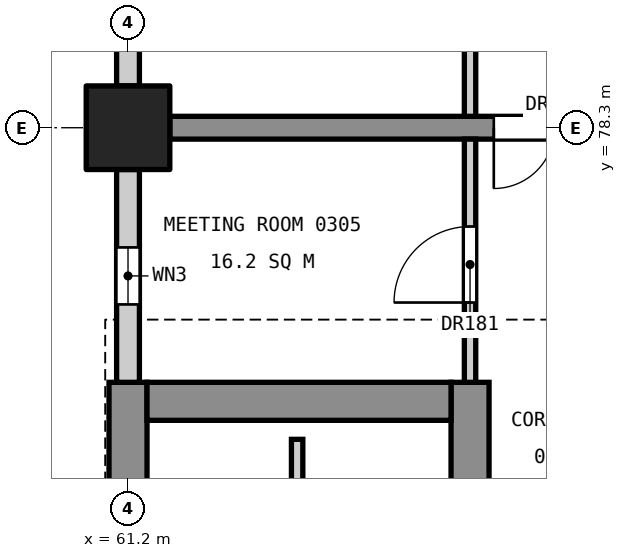
"""IFC4 building model, lengths in metres.
Left out: names, types, materials, properties, quantities, classifications, styles, units other than length and angle.
Written with IfcOpenShell. Run it as: python <this file> out.ifc"""

import sys

from ifc_helpers import new_model, si_unit, direction, frame, frame_2d, origin, origin_2d, place, context, subcontext, project, spatial, rectangle, extrude, element, fill, save


model = new_model("IFC4")
c1 = context("Model", 3, precision=1e-05, world=origin(), true_north=direction((0.0, 1.0)))
c2 = subcontext(c1, "Body", "Model", "MODEL_VIEW")
j1 = project(units=[si_unit("LENGTHUNIT", "METRE"), si_unit("PLANEANGLEUNIT", "RADIAN")], contexts=[c1])
p1 = place(None, origin())
s1 = spatial("IfcSite", under=j1, at=p1, CompositionType="ELEMENT")
p2 = place(p1, origin())
s2 = spatial("IfcBuilding", under=s1, at=p2, CompositionType="ELEMENT")
p3 = place(p2, frame((0.0, 0.0, 16.8)))
s3 = spatial("IfcBuildingStorey", under=s2, at=p3, CompositionType="ELEMENT", Elevation=16.8)
p4 = place(p3, frame((61.2, 78.3, 0.0), z_axis=(0.0, 0.0, 1.0), x_axis=(1.0, 0.0, 0.0)))
e1 = element("IfcColumn", 1, at=p4, inside=s3, PredefinedType="COLUMN", context=c2, shape_type="SweptSolid", body=[
    extrude(rectangle(XDim=1.1, YDim=1.1, at=origin_2d()), origin(), (0.0, 0.0, 1.0), 5.4),
])
p5 = place(p3, frame((61.2, 60.05, 0.0), z_axis=(0.0, 0.0, 1.0), x_axis=(0.0, 1.0, 0.0)))
e2 = element("IfcWall", 2, at=p5, inside=s3, PredefinedType="SHEAR", context=c2, shape_type="SweptSolid", body=[
    extrude(rectangle(XDim=14.9, YDim=0.5, at=frame_2d((7.45, 0.0))), origin(), (0.0, 0.0, 1.0), 5.15),
])
p6 = place(p5, frame((6.3, 0.0, 3.4)))
e3 = element("IfcOpeningElement", 3, at=p6, cuts=e2, PredefinedType="OPENING", context=c2, shape_type="SweptSolid", body=[
    extrude(rectangle(XDim=1.2, YDim=0.9, at=frame_2d((0.6, 0.45))), frame((0.0, 0.26, 0.0), z_axis=(0.0, -1.0, 0.0), x_axis=(1.0, 0.0, 0.0)), (0.0, 0.0, 1.0), 0.52),
])
p7 = place(p3, frame((65.7, 60.05, 0.0), z_axis=(0.0, 0.0, 1.0), x_axis=(0.0, 1.0, 0.0)))
e4 = element("IfcWall", 4, at=p7, inside=s3, PredefinedType="SHEAR", context=c2, shape_type="SweptSolid", body=[
    extrude(rectangle(XDim=14.9, YDim=0.5, at=frame_2d((7.45, 0.0))), origin(), (0.0, 0.0, 1.0), 5.15),
])
p8 = place(p7, frame((0.55, 0.0, 0.0)))
e5 = element("IfcOpeningElement", 5, at=p8, cuts=e4, PredefinedType="OPENING", context=c2, shape_type="SweptSolid", body=[
    extrude(rectangle(XDim=1.4, YDim=2.1, at=frame_2d((0.7, 1.05))), frame((0.0, 0.26, 0.0), z_axis=(0.0, -1.0, 0.0), x_axis=(1.0, 0.0, 0.0)), (0.0, 0.0, 1.0), 0.52),
])
p9 = place(p7, frame((8.85, 0.0, 0.0)))
e6 = element("IfcOpeningElement", 6, at=p9, cuts=e4, PredefinedType="OPENING", context=c2, shape_type="SweptSolid", body=[
    extrude(rectangle(XDim=1.1, YDim=2.1, at=frame_2d((0.55, 1.05))), frame((0.0, 0.26, 0.0), z_axis=(0.0, -1.0, 0.0), x_axis=(1.0, 0.0, 0.0)), (0.0, 0.0, 1.0), 0.52),
])
p10 = place(p7, frame((11.4, 0.0, 0.0)))
e7 = element("IfcOpeningElement", 7, at=p10, cuts=e4, PredefinedType="OPENING", context=c2, shape_type="SweptSolid", body=[
    extrude(rectangle(XDim=1.1, YDim=2.1, at=frame_2d((0.55, 1.05))), frame((0.0, 0.26, 0.0), z_axis=(0.0, -1.0, 0.0), x_axis=(1.0, 0.0, 0.0)), (0.0, 0.0, 1.0), 0.52),
])
p11 = place(p3, frame((61.45, 74.7, 0.0), z_axis=(0.0, 0.0, 1.0), x_axis=(1.0, 0.0, 0.0)))
e8 = element("IfcWall", 8, at=p11, inside=s3, PredefinedType="SHEAR", context=c2, shape_type="SweptSolid", body=[
    extrude(rectangle(XDim=4.0, YDim=0.5, at=frame_2d((2.0, 0.0))), origin(), (0.0, 0.0, 1.0), 5.15),
])
p12 = place(p3, frame((61.75, 78.3, 0.0), z_axis=(0.0, 0.0, 1.0), x_axis=(1.0, 0.0, 0.0)))
e9 = element("IfcWall", 9, at=p12, inside=s3, PredefinedType="SHEAR", context=c2, shape_type="SweptSolid", body=[
    extrude(rectangle(XDim=6.1, YDim=0.3, at=frame_2d((3.05, 0.0))), origin(), (0.0, 0.0, 1.0), 5.15),
])
p13 = place(p12, frame((4.262, 0.0, 0.0)))
e10 = element("IfcOpeningElement", 10, at=p13, cuts=e9, PredefinedType="OPENING", context=c2, shape_type="SweptSolid", body=[
    extrude(rectangle(XDim=1.6, YDim=2.1, at=frame_2d((0.8, 1.05))), frame((0.0, 0.16, 0.0), z_axis=(0.0, -1.0, 0.0), x_axis=(1.0, 0.0, 0.0)), (0.0, 0.0, 1.0), 0.32),
])
p14 = place(p3, frame((63.425, 73.3, 0.0), z_axis=(0.0, 0.0, 1.0), x_axis=(0.0, 1.0, 0.0)))
e11 = element("IfcWall", 11, at=p14, inside=s3, PredefinedType="SOLIDWALL", context=c2, shape_type="SweptSolid", body=[
    extrude(rectangle(XDim=0.9, YDim=0.15, at=frame_2d((0.45, 0.0))), origin(), (0.0, 0.0, 1.0), 5.4),
])
p15 = place(p3, frame((61.2, 74.95, 0.0), z_axis=(0.0, 0.0, 1.0), x_axis=(0.0, 1.0, 0.0)))
e12 = element("IfcWall", 12, at=p15, inside=s3, PredefinedType="STANDARD", context=c2, shape_type="SweptSolid", body=[
    extrude(rectangle(XDim=2.8, YDim=0.3, at=frame_2d((1.4, 0.0))), origin(), (0.0, 0.0, 1.0), 4.25),
])
p16 = place(p15, frame((1.025, 0.0, 0.8)))
e13 = element("IfcOpeningElement", 13, at=p16, cuts=e12, PredefinedType="OPENING", context=c2, shape_type="SweptSolid", body=[
    extrude(rectangle(XDim=0.75, YDim=1.2, at=frame_2d((0.375, 0.6))), frame((0.0, 0.16, 0.0), z_axis=(0.0, -1.0, 0.0), x_axis=(1.0, 0.0, 0.0)), (0.0, 0.0, 1.0), 0.32),
])
p17 = place(p3, frame((61.2, 78.85, 0.0), z_axis=(0.0, 0.0, 1.0), x_axis=(0.0, 1.0, 0.0)))
e14 = element("IfcWall", 14, at=p17, inside=s3, PredefinedType="STANDARD", context=c2, shape_type="SweptSolid", body=[
    extrude(rectangle(XDim=10.0, YDim=0.3, at=frame_2d((5.0, 0.0))), origin(), (0.0, 0.0, 1.0), 4.25),
])
p18 = place(p17, frame((0.625, 0.0, 0.9)))
e15 = element("IfcOpeningElement", 15, at=p18, cuts=e14, PredefinedType="OPENING", context=c2, shape_type="SweptSolid", body=[
    extrude(rectangle(XDim=1.8, YDim=3.0, at=frame_2d((0.9, 1.5))), frame((0.0, 0.16, 0.0), z_axis=(0.0, -1.0, 0.0), x_axis=(1.0, 0.0, 0.0)), (0.0, 0.0, 1.0), 0.32),
])
p19 = place(p17, frame((3.95, 0.0, 0.9)))
e16 = element("IfcOpeningElement", 16, at=p19, cuts=e14, PredefinedType="OPENING", context=c2, shape_type="SweptSolid", body=[
    extrude(rectangle(XDim=1.8, YDim=3.0, at=frame_2d((0.9, 1.5))), frame((0.0, 0.16, 0.0), z_axis=(0.0, -1.0, 0.0), x_axis=(1.0, 0.0, 0.0)), (0.0, 0.0, 1.0), 0.32),
])
p20 = place(p17, frame((7.95, 0.0, 0.8)))
e17 = element("IfcOpeningElement", 17, at=p20, cuts=e14, PredefinedType="OPENING", context=c2, shape_type="SweptSolid", body=[
    extrude(rectangle(XDim=0.75, YDim=1.2, at=frame_2d((0.375, 0.6))), frame((0.0, 0.16, 0.0), z_axis=(0.0, -1.0, 0.0), x_axis=(1.0, 0.0, 0.0)), (0.0, 0.0, 1.0), 0.32),
])
p21 = place(p3, frame((65.7, 74.95, 0.0), z_axis=(0.0, 0.0, 1.0), x_axis=(0.0, 1.0, 0.0)))
e18 = element("IfcWall", 18, at=p21, inside=s3, PredefinedType="PARTITIONING", context=c2, shape_type="SweptSolid", body=[
    extrude(rectangle(XDim=3.2, YDim=0.15, at=frame_2d((1.6, 0.0))), origin(), (0.0, 0.0, 1.0), 4.05),
])
p22 = place(p21, frame((1.05, 0.0, 0.0)))
e19 = element("IfcOpeningElement", 19, at=p22, cuts=e18, PredefinedType="OPENING", context=c2, shape_type="SweptSolid", body=[
    extrude(rectangle(XDim=1.0, YDim=2.1, at=frame_2d((0.5, 1.05))), frame((0.0, 0.085, 0.0), z_axis=(0.0, -1.0, 0.0), x_axis=(1.0, 0.0, 0.0)), (0.0, 0.0, 1.0), 0.17),
])
p23 = place(p3, frame((65.7, 78.45, 0.0), z_axis=(0.0, 0.0, 1.0), x_axis=(0.0, 1.0, 0.0)))
e20 = element("IfcWall", 20, at=p23, inside=s3, PredefinedType="PARTITIONING", context=c2, shape_type="SweptSolid", body=[
    extrude(rectangle(XDim=10.4, YDim=0.15, at=frame_2d((5.2, 0.0))), origin(), (0.0, 0.0, 1.0), 4.05),
])
p24 = place(p23, frame((4.75, 0.0, 0.0)))
e21 = element("IfcOpeningElement", 21, at=p24, cuts=e20, PredefinedType="OPENING", context=c2, shape_type="SweptSolid", body=[
    extrude(rectangle(XDim=1.0, YDim=2.1, at=frame_2d((0.5, 1.05))), frame((0.0, 0.085, 0.0), z_axis=(0.0, -1.0, 0.0), x_axis=(1.0, 0.0, 0.0)), (0.0, 0.0, 1.0), 0.17),
])
p25 = place(p23, frame((1.15, 0.0, 0.0)))
e22 = element("IfcOpeningElement", 22, at=p25, cuts=e20, PredefinedType="OPENING", context=c2, shape_type="SweptSolid", body=[
    extrude(rectangle(XDim=1.0, YDim=2.1, at=frame_2d((0.5, 1.05))), frame((0.0, 0.085, 0.0), z_axis=(0.0, -1.0, 0.0), x_axis=(1.0, 0.0, 0.0)), (0.0, 0.0, 1.0), 0.17),
])
p26 = place(p23, frame((8.35, 0.0, 0.0)))
e23 = element("IfcOpeningElement", 23, at=p26, cuts=e20, PredefinedType="OPENING", context=c2, shape_type="SweptSolid", body=[
    extrude(rectangle(XDim=1.0, YDim=2.1, at=frame_2d((0.5, 1.05))), frame((0.0, 0.085, 0.0), z_axis=(0.0, -1.0, 0.0), x_axis=(1.0, 0.0, 0.0)), (0.0, 0.0, 1.0), 0.17),
])
p27 = place(p16, origin())
e24 = element("IfcWindow", 24, at=p27, inside=s3, PartitioningType="SINGLE_PANEL", PredefinedType="WINDOW", context=c2, shape_type="SweptSolid", body=[
    extrude(rectangle(XDim=0.75, YDim=1.2, at=frame_2d((0.375, 0.6))), frame((0.0, 0.03, 0.0), z_axis=(0.0, -1.0, 0.0), x_axis=(1.0, 0.0, 0.0)), (0.0, 0.0, 1.0), 0.06),
])
fill(e13, e24)
p28 = place(p22, origin())
e25 = element("IfcDoor", 25, at=p28, inside=s3, OperationType="SINGLE_SWING_LEFT", PredefinedType="DOOR", context=c2, shape_type="SweptSolid", body=[
    extrude(rectangle(XDim=1.0, YDim=2.1, at=frame_2d((0.5, 1.05))), frame((0.0, 0.025, 0.0), z_axis=(0.0, -1.0, 0.0), x_axis=(1.0, 0.0, 0.0)), (0.0, 0.0, 1.0), 0.05),
])
fill(e19, e25)
p29 = place(p13, frame((1.6, 0.0, 0.0), z_axis=(0.0, 0.0, 1.0), x_axis=(-1.0, 0.0, 0.0)))
e26 = element("IfcDoor", 26, at=p29, inside=s3, OperationType="DOUBLE_DOOR_SINGLE_SWING", PredefinedType="DOOR", context=c2, shape_type="SweptSolid", body=[
    extrude(rectangle(XDim=1.6, YDim=2.1, at=frame_2d((0.8, 1.05))), frame((0.0, 0.025, 0.0), z_axis=(0.0, -1.0, 0.0), x_axis=(1.0, 0.0, 0.0)), (0.0, 0.0, 1.0), 0.05),
])
fill(e10, e26)
save(model, sys.argv[1])
